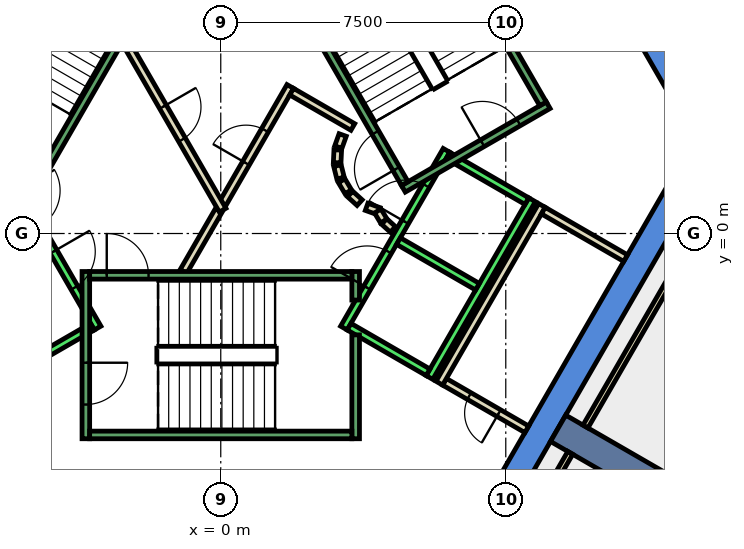
"""IFC4 building model, lengths in metres.
Left out: names, types, materials, properties, quantities, classifications, styles, units other than length and angle.
Written with IfcOpenShell. Run it as: python <this file> out.ifc"""

import sys

from ifc_helpers import new_model, si_unit, direction, frame, frame_2d, origin, place, context, subcontext, project, spatial, polyline, rectangle, outline, extrude, element, fill, save


model = new_model("IFC4")
c1 = context("Model", 3, precision=1e-05, world=origin(), true_north=direction((0.0, 1.0)))
c2 = subcontext(c1, "Body", "Model", "MODEL_VIEW")
j1 = project(units=[si_unit("LENGTHUNIT", "METRE"), si_unit("PLANEANGLEUNIT", "RADIAN")], contexts=[c1])
p1 = place(None, origin())
s1 = spatial("IfcSite", under=j1, at=p1, CompositionType="ELEMENT")
p2 = place(p1, origin())
s2 = spatial("IfcBuilding", under=s1, at=p2, CompositionType="ELEMENT")
p3 = place(p2, frame((0.0, 0.0, 202.4)))
s3 = spatial("IfcBuildingStorey", under=s2, at=p3, CompositionType="ELEMENT", Elevation=202.4)
p4 = place(p3, frame((0.0, 0.0, -0.4)))
e1 = element("IfcWall", 1, at=p4, inside=s3, PredefinedType="SHEAR", context=c2, shape_type="SweptSolid", body=[
    extrude(outline(polyline([(8.084, 11.498), (7.478, 11.148), (12.471, 2.5), (13.279, 2.5), (8.084, 11.498)])), origin(), (0.0, 0.0, 1.0), 4.2),
])
p5 = place(p3, frame((0.0, 0.0, -0.4)))
e2 = element("IfcWall", 2, at=p5, inside=s3, PredefinedType="SHEAR", context=c2, shape_type="SweptSolid", body=[
    extrude(outline(polyline([(6.64, -9.0), (13.279, 2.5), (12.471, 2.5), (6.235, -8.3), (6.64, -9.0)])), origin(), (0.0, 0.0, 1.0), 4.2),
])
p6 = place(p3, frame((8.877, -5.125, -0.4), z_axis=(0.0, 0.0, 1.0), x_axis=(0.866017533419, -0.500013631625, 0.0)))
e3 = element("IfcWall", 3, at=p6, inside=s3, PredefinedType="SHEAR", context=c2, shape_type="SweptSolid", body=[
    extrude(rectangle(XDim=9.0, YDim=0.8, at=frame_2d((4.5, 0.0))), origin(), (0.0, 0.0, 1.0), 4.2),
])
p7 = place(p3, frame((8.053, -5.152, 0.0), z_axis=(0.0, 0.0, 1.0), x_axis=(-0.866022959057, 0.500004234368, 0.0)))
e4 = element("IfcWall", 4, at=p7, inside=s3, PredefinedType="PARTITIONING", context=c2, shape_type="SweptSolid", body=[
    extrude(rectangle(XDim=2.5, YDim=0.2, at=frame_2d((1.25, 0.0))), origin(), (0.0, 0.0, 1.0), 3.8),
])
p8 = place(p7, frame((0.85, 0.0, 0.0)))
e5 = element("IfcOpeningElement", 5, at=p8, cuts=e4, PredefinedType="OPENING", context=c2, shape_type="SweptSolid", body=[
    extrude(rectangle(XDim=0.9, YDim=2.1, at=frame_2d((0.45, 1.05))), frame((0.0, 0.11, 0.0), z_axis=(0.0, -1.0, 0.0), x_axis=(1.0, 0.0, 0.0)), (0.0, 0.0, 1.0), 0.22),
])
p9 = place(p3, frame((5.751, -3.938, 0.0), z_axis=(0.0, 0.0, 1.0), x_axis=(0.500034260056, 0.866005622828, 0.0)))
e6 = element("IfcWall", 6, at=p9, inside=s3, PredefinedType="PARTITIONING", context=c2, shape_type="SweptSolid", body=[
    extrude(rectangle(XDim=5.399, YDim=0.2, at=frame_2d((2.7, 0.0))), origin(), (0.0, 0.0, 1.0), 3.8),
])
p10 = place(p3, frame((8.488, 0.602, 0.0), z_axis=(0.0, 0.0, 1.0), x_axis=(0.866022959057, -0.500004234368, 0.0)))
e7 = element("IfcWall", 7, at=p10, inside=s3, PredefinedType="PARTITIONING", context=c2, shape_type="SweptSolid", body=[
    extrude(rectangle(XDim=2.5, YDim=0.2, at=frame_2d((1.25, 0.0))), origin(), (0.0, 0.0, 1.0), 3.8),
])
p11 = place(p3, frame((7.283, -9.086, 0.0), z_axis=(0.0, 0.0, 1.0), x_axis=(0.500035303972, 0.866005020067, 0.0)))
e8 = element("IfcWall", 8, at=p11, inside=s3, PredefinedType="PARTITIONING", context=c2, shape_type="SweptSolid", body=[
    extrude(rectangle(XDim=3.828, YDim=0.15, at=frame_2d((1.914, 0.0))), origin(), (0.0, 0.0, 1.0), 3.8),
])
p12 = place(p3, frame((-0.982, -1.0, 0.0), z_axis=(0.0, 0.0, 1.0), x_axis=(0.50024047865, 0.865886518847, 0.0)))
e9 = element("IfcWall", 9, at=p12, inside=s3, PredefinedType="PARTITIONING", context=c2, shape_type="SweptSolid", body=[
    extrude(rectangle(XDim=1.863, YDim=0.2, at=frame_2d((0.931, 0.0))), origin(), (0.0, 0.0, 1.0), 3.8),
])
p13 = place(p3, frame((0.05, 0.787, 0.0), z_axis=(0.0, 0.0, 1.0), x_axis=(0.499954076797, 0.866051915934, 0.0)))
e10 = element("IfcWall", 10, at=p13, inside=s3, PredefinedType="PARTITIONING", context=c2, shape_type="SweptSolid", body=[
    extrude(rectangle(XDim=3.558, YDim=0.2, at=frame_2d((1.779, 0.0))), origin(), (0.0, 0.0, 1.0), 3.8),
])
p14 = place(p13, frame((1.229, 0.0, 0.0)))
e11 = element("IfcOpeningElement", 11, at=p14, cuts=e10, PredefinedType="OPENING", context=c2, shape_type="SweptSolid", body=[
    extrude(rectangle(XDim=1.0, YDim=2.1, at=frame_2d((0.5, 1.05))), frame((0.0, 0.11, 0.0), z_axis=(0.0, -1.0, 0.0), x_axis=(1.0, 0.0, 0.0)), (0.0, 0.0, 1.0), 0.22),
])
p15 = place(p3, frame((1.866, 3.732, 0.0), z_axis=(0.0, 0.0, 1.0), x_axis=(0.866043361281, -0.499968895414, 0.0)))
e12 = element("IfcWall", 12, at=p15, inside=s3, PredefinedType="PARTITIONING", context=c2, shape_type="SweptSolid", body=[
    extrude(rectangle(XDim=1.858, YDim=0.2, at=frame_2d((0.929, 0.0))), origin(), (0.0, 0.0, 1.0), 3.8),
])
p16 = place(p3, frame((3.208, 2.592, 0.0), z_axis=(0.0, 0.0, 1.0), x_axis=(-0.337388820924, -0.941365382578, 0.0)))
e13 = element("IfcWall", 13, at=p16, inside=s3, PredefinedType="PARTITIONING", context=c2, shape_type="SweptSolid", body=[
    extrude(rectangle(XDim=0.338, YDim=0.2, at=frame_2d((0.169, 0.0))), origin(), (0.0, 0.0, 1.0), 3.8),
])
p17 = place(p3, frame((3.079, 2.199, 0.0), z_axis=(0.0, 0.0, 1.0), x_axis=(-0.047771483479, -0.998858290933, 0.0)))
e14 = element("IfcWall", 14, at=p17, inside=s3, PredefinedType="PARTITIONING", context=c2, shape_type="SweptSolid", body=[
    extrude(rectangle(XDim=0.337, YDim=0.2, at=frame_2d((0.169, 0.0))), origin(), (0.0, 0.0, 1.0), 3.8),
])
p18 = place(p3, frame((3.07, 1.786, 0.0), z_axis=(0.0, 0.0, 1.0), x_axis=(0.242705583207, -0.970099994784, 0.0)))
e15 = element("IfcWall", 15, at=p18, inside=s3, PredefinedType="PARTITIONING", context=c2, shape_type="SweptSolid", body=[
    extrude(rectangle(XDim=0.338, YDim=0.2, at=frame_2d((0.169, 0.0))), origin(), (0.0, 0.0, 1.0), 3.8),
])
for number, where, z_axis, x_axis in (
    (16, (3.182, 1.388, 0.0), (0.0, 0.0, 1.0), (0.512, -0.859, 0.0)),
    (17, (3.404, 1.039, 0.0), (0.0, 0.0, 1.0), (0.74, -0.672, 0.0)),
):
    element("IfcWall", number, at=place(p3, frame(where, z_axis=z_axis, x_axis=x_axis)), inside=s3, PredefinedType="PARTITIONING", context=c2, shape_type="SweptSolid", body=[
        extrude(rectangle(XDim=0.338, YDim=0.2, at=frame_2d((0.169, 0.0))), origin(), (0.0, 0.0, 1.0), 3.8),
    ])
p19 = place(p3, frame((3.838, 0.702, 0.0), z_axis=(0.0, 0.0, 1.0), x_axis=(0.941035081519, -0.338308993895, 0.0)))
e18 = element("IfcWall", 18, at=p19, inside=s3, PredefinedType="PARTITIONING", context=c2, shape_type="SweptSolid", body=[
    extrude(rectangle(XDim=0.337, YDim=0.2, at=frame_2d((0.168, 0.0))), origin(), (0.0, 0.0, 1.0), 3.8),
])
p20 = place(p3, frame((4.132, 0.593, 0.0), z_axis=(0.0, 0.0, 1.0), x_axis=(0.513561617048, -0.858052717201, 0.0)))
e19 = element("IfcWall", 19, at=p20, inside=s3, PredefinedType="PARTITIONING", context=c2, shape_type="SweptSolid", body=[
    extrude(rectangle(XDim=0.308, YDim=0.2, at=frame_2d((0.154, 0.0))), origin(), (0.0, 0.0, 1.0), 3.8),
])
p21 = place(p3, frame((4.301, 0.315, 0.0), z_axis=(0.0, 0.0, 1.0), x_axis=(0.741798017506, -0.670623367639, 0.0)))
e20 = element("IfcWall", 20, at=p21, inside=s3, PredefinedType="PARTITIONING", context=c2, shape_type="SweptSolid", body=[
    extrude(rectangle(XDim=0.309, YDim=0.2, at=frame_2d((0.154, 0.0))), origin(), (0.0, 0.0, 1.0), 3.8),
])
p22 = place(p3, frame((-2.54, 5.1, 0.0), z_axis=(0.0, 0.0, 1.0), x_axis=(0.499925051871, -0.866068670783, 0.0)))
e21 = element("IfcWall", 21, at=p22, inside=s3, PredefinedType="PARTITIONING", context=c2, shape_type="SweptSolid", body=[
    extrude(rectangle(XDim=5.181, YDim=0.2, at=frame_2d((2.59, 0.0))), origin(), (0.0, 0.0, 1.0), 3.8),
])
p23 = place(p22, frame((2.04, 0.0, 0.0)))
e22 = element("IfcOpeningElement", 22, at=p23, cuts=e21, PredefinedType="OPENING", context=c2, shape_type="SweptSolid", body=[
    extrude(rectangle(XDim=1.0, YDim=2.1, at=frame_2d((0.5, 1.05))), frame((0.0, 0.11, 0.0), z_axis=(0.0, -1.0, 0.0), x_axis=(1.0, 0.0, 0.0)), (0.0, 0.0, 1.0), 0.22),
])
p24 = place(p3, frame((9.597, -5.079, 0.0), z_axis=(0.0, 0.0, 1.0), x_axis=(0.499962477963, 0.866047066059, 0.0)))
e23 = element("IfcWall", 23, at=p24, inside=s3, PredefinedType="PARTITIONING", context=c2, shape_type="SweptSolid", body=[
    extrude(rectangle(XDim=9.979, YDim=0.15, at=frame_2d((4.989, 0.0))), origin(), (0.0, 0.0, 1.0), 3.8),
])
p25 = place(p3, frame((-5.94, 2.188, 0.0), z_axis=(0.0, 0.0, 1.0), x_axis=(0.500034260056, -0.866005622828, 0.0)))
e24 = element("IfcWall", 24, at=p25, inside=s3, PredefinedType="STANDARD", context=c2, shape_type="SweptSolid", body=[
    extrude(rectangle(XDim=5.399, YDim=0.2, at=frame_2d((2.7, 0.0))), origin(), (0.0, 0.0, 1.0), 3.8),
])
p26 = place(p25, frame((3.075, 0.0, 0.0)))
e25 = element("IfcOpeningElement", 25, at=p26, cuts=e24, PredefinedType="OPENING", context=c2, shape_type="SweptSolid", body=[
    extrude(rectangle(XDim=1.1, YDim=2.1, at=frame_2d((0.55, 1.05))), frame((0.0, 0.11, 0.0), z_axis=(0.0, -1.0, 0.0), x_axis=(1.0, 0.0, 0.0)), (0.0, 0.0, 1.0), 0.22),
])
p27 = place(p25, frame((1.225, 0.0, 0.0)))
e26 = element("IfcOpeningElement", 26, at=p27, cuts=e24, PredefinedType="OPENING", context=c2, shape_type="SweptSolid", body=[
    extrude(rectangle(XDim=1.1, YDim=2.1, at=frame_2d((0.55, 1.05))), frame((0.0, 0.11, 0.0), z_axis=(0.0, -1.0, 0.0), x_axis=(1.0, 0.0, 0.0)), (0.0, 0.0, 1.0), 0.22),
])
p28 = place(p3, frame((-3.377, -2.452, 0.0), z_axis=(0.0, 0.0, 1.0), x_axis=(-0.865955154139, -0.50012165622, 0.0)))
e27 = element("IfcWall", 27, at=p28, inside=s3, PredefinedType="STANDARD", context=c2, shape_type="SweptSolid", body=[
    extrude(rectangle(XDim=2.4, YDim=0.2, at=frame_2d((1.2, 0.0))), origin(), (0.0, 0.0, 1.0), 3.8),
])
p29 = place(p3, frame((3.24, -2.488, 0.0), z_axis=(0.0, 0.0, 1.0), x_axis=(0.500034260056, 0.866005622828, 0.0)))
e28 = element("IfcWall", 28, at=p29, inside=s3, PredefinedType="STANDARD", context=c2, shape_type="SweptSolid", body=[
    extrude(rectangle(XDim=5.399, YDim=0.2, at=frame_2d((2.7, 0.0))), origin(), (0.0, 0.0, 1.0), 3.8),
])
p30 = place(p29, frame((3.225, 0.0, 0.0)))
e29 = element("IfcOpeningElement", 29, at=p30, cuts=e28, PredefinedType="OPENING", context=c2, shape_type="SweptSolid", body=[
    extrude(rectangle(XDim=1.1, YDim=2.1, at=frame_2d((0.55, 1.05))), frame((0.0, 0.11, 0.0), z_axis=(0.0, -1.0, 0.0), x_axis=(1.0, 0.0, 0.0)), (0.0, 0.0, 1.0), 0.22),
])
p31 = place(p29, frame((1.225, 0.0, 0.0)))
e30 = element("IfcOpeningElement", 30, at=p31, cuts=e28, PredefinedType="OPENING", context=c2, shape_type="SweptSolid", body=[
    extrude(rectangle(XDim=1.1, YDim=2.1, at=frame_2d((0.55, 1.05))), frame((0.0, 0.11, 0.0), z_axis=(0.0, -1.0, 0.0), x_axis=(1.0, 0.0, 0.0)), (0.0, 0.0, 1.0), 0.22),
])
p32 = place(p3, frame((5.492, -3.788, 0.0), z_axis=(0.0, 0.0, 1.0), x_axis=(0.500034260056, 0.866005622828, 0.0)))
e31 = element("IfcWall", 31, at=p32, inside=s3, PredefinedType="STANDARD", context=c2, shape_type="SweptSolid", body=[
    extrude(rectangle(XDim=5.399, YDim=0.2, at=frame_2d((2.7, 0.0))), origin(), (0.0, 0.0, 1.0), 3.8),
])
p33 = place(p3, frame((3.377, -2.452, 0.0), z_axis=(0.0, 0.0, 1.0), x_axis=(0.865955154139, -0.50012165622, 0.0)))
e32 = element("IfcWall", 32, at=p33, inside=s3, PredefinedType="STANDARD", context=c2, shape_type="SweptSolid", body=[
    extrude(rectangle(XDim=2.4, YDim=0.2, at=frame_2d((1.2, 0.0))), origin(), (0.0, 0.0, 1.0), 3.8),
])
for number, where, z_axis, x_axis in (
    (33, (4.677, -0.2, 0.0), (0.0, 0.0, 1.0), (0.866, -0.5, 0.0)),
    (34, (5.977, 2.052, 0.0), (0.0, 0.0, 1.0), (0.866, -0.5, 0.0)),
):
    element("IfcWall", number, at=place(p3, frame(where, z_axis=z_axis, x_axis=x_axis)), inside=s3, PredefinedType="STANDARD", context=c2, shape_type="SweptSolid", body=[
        extrude(rectangle(XDim=2.399, YDim=0.2, at=frame_2d((1.2, 0.0))), origin(), (0.0, 0.0, 1.0), 3.8),
    ])
p34 = place(p3, frame((-3.55, -1.0, 0.0), z_axis=(0.0, 0.0, 1.0), x_axis=(0.0, -1.0, 0.0)))
e35 = element("IfcWall", 35, at=p34, inside=s3, PredefinedType="STANDARD", context=c2, shape_type="SweptSolid", body=[
    extrude(rectangle(XDim=4.4, YDim=0.2, at=frame_2d((2.2, 0.0))), origin(), (0.0, 0.0, 1.0), 3.8),
])
p35 = place(p34, frame((2.4, 0.0, 0.0)))
e36 = element("IfcOpeningElement", 36, at=p35, cuts=e35, PredefinedType="OPENING", context=c2, shape_type="SweptSolid", body=[
    extrude(rectangle(XDim=1.1, YDim=2.2, at=frame_2d((0.55, 1.1))), frame((0.0, 0.11, 0.0), z_axis=(0.0, -1.0, 0.0), x_axis=(1.0, 0.0, 0.0)), (0.0, 0.0, 1.0), 0.22),
])
p36 = place(p3, frame((3.55, -2.667, 0.0), z_axis=(0.0, 0.0, 1.0), x_axis=(0.0, -1.0, 0.0)))
e37 = element("IfcWall", 37, at=p36, inside=s3, PredefinedType="STANDARD", context=c2, shape_type="SweptSolid", body=[
    extrude(rectangle(XDim=2.733, YDim=0.2, at=frame_2d((1.366, 0.0))), origin(), (0.0, 0.0, 1.0), 3.8),
])
p37 = place(p3, frame((3.55, -1.0, 0.0), z_axis=(0.0, 0.0, 1.0), x_axis=(0.0, -1.0, 0.0)))
e38 = element("IfcWall", 38, at=p37, inside=s3, PredefinedType="STANDARD", context=c2, shape_type="SweptSolid", body=[
    extrude(rectangle(XDim=0.751, YDim=0.2, at=frame_2d((0.375, 0.0))), origin(), (0.0, 0.0, 1.0), 3.8),
])
p38 = place(p3, frame((-3.45, -1.1, 0.0), z_axis=(0.0, 0.0, 1.0), x_axis=(1.0, 0.0, 0.0)))
e39 = element("IfcWall", 39, at=p38, inside=s3, PredefinedType="STANDARD", context=c2, shape_type="SweptSolid", body=[
    extrude(rectangle(XDim=6.9, YDim=0.2, at=frame_2d((3.45, 0.0))), origin(), (0.0, 0.0, 1.0), 3.8),
])
p39 = place(p38, frame((0.45, 0.0, 0.0)))
e40 = element("IfcOpeningElement", 40, at=p39, cuts=e39, PredefinedType="OPENING", context=c2, shape_type="SweptSolid", body=[
    extrude(rectangle(XDim=1.1, YDim=2.2, at=frame_2d((0.55, 1.1))), frame((0.0, 0.11, 0.0), z_axis=(0.0, -1.0, 0.0), x_axis=(1.0, 0.0, 0.0)), (0.0, 0.0, 1.0), 0.22),
])
p40 = place(p3, frame((-3.45, -5.3, 0.0), z_axis=(0.0, 0.0, 1.0), x_axis=(1.0, 0.0, 0.0)))
e41 = element("IfcWall", 41, at=p40, inside=s3, PredefinedType="STANDARD", context=c2, shape_type="SweptSolid", body=[
    extrude(rectangle(XDim=6.9, YDim=0.2, at=frame_2d((3.45, 0.0))), origin(), (0.0, 0.0, 1.0), 3.8),
])
p41 = place(p3, frame((4.806, 1.176, 0.0), z_axis=(0.0, 0.0, 1.0), x_axis=(0.866059941101, 0.499940174841, 0.0)))
e42 = element("IfcWall", 42, at=p41, inside=s3, PredefinedType="STANDARD", context=c2, shape_type="SweptSolid", body=[
    extrude(rectangle(XDim=4.4, YDim=0.2, at=frame_2d((2.2, 0.0))), origin(), (0.0, 0.0, 1.0), 3.8),
])
p42 = place(p41, frame((2.4, 0.0, 0.0)))
e43 = element("IfcOpeningElement", 43, at=p42, cuts=e42, PredefinedType="OPENING", context=c2, shape_type="SweptSolid", body=[
    extrude(rectangle(XDim=1.1, YDim=2.2, at=frame_2d((0.55, 1.1))), frame((0.0, 0.11, 0.0), z_axis=(0.0, -1.0, 0.0), x_axis=(1.0, 0.0, 0.0)), (0.0, 0.0, 1.0), 0.22),
])
p43 = place(p3, frame((4.843, 1.312, 0.0), z_axis=(0.0, 0.0, 1.0), x_axis=(-0.499963383562, 0.866046543262, 0.0)))
e44 = element("IfcWall", 44, at=p43, inside=s3, PredefinedType="STANDARD", context=c2, shape_type="SweptSolid", body=[
    extrude(rectangle(XDim=6.9, YDim=0.2, at=frame_2d((3.45, 0.0))), origin(), (0.0, 0.0, 1.0), 3.8),
])
p44 = place(p43, frame((0.45, 0.0, 0.0)))
e45 = element("IfcOpeningElement", 45, at=p44, cuts=e44, PredefinedType="OPENING", context=c2, shape_type="SweptSolid", body=[
    extrude(rectangle(XDim=1.1, YDim=2.2, at=frame_2d((0.55, 1.1))), frame((0.0, 0.11, 0.0), z_axis=(0.0, -1.0, 0.0), x_axis=(1.0, 0.0, 0.0)), (0.0, 0.0, 1.0), 0.22),
])
p45 = place(p3, frame((8.48, 3.412, 0.0), z_axis=(0.0, 0.0, 1.0), x_axis=(-0.499978703459, 0.866037698999, 0.0)))
e46 = element("IfcWall", 46, at=p45, inside=s3, PredefinedType="STANDARD", context=c2, shape_type="SweptSolid", body=[
    extrude(rectangle(XDim=6.9, YDim=0.2, at=frame_2d((3.45, 0.0))), origin(), (0.0, 0.0, 1.0), 3.8),
])
p46 = place(p3, frame((-1.393, 7.288, 0.0), z_axis=(0.0, 0.0, 1.0), x_axis=(-0.499963383562, -0.866046543262, 0.0)))
e47 = element("IfcWall", 47, at=p46, inside=s3, PredefinedType="STANDARD", context=c2, shape_type="SweptSolid", body=[
    extrude(rectangle(XDim=6.9, YDim=0.2, at=frame_2d((3.45, 0.0))), origin(), (0.0, 0.0, 1.0), 3.8),
])
p47 = place(p46, frame((0.45, 0.0, 0.0)))
e48 = element("IfcOpeningElement", 48, at=p47, cuts=e47, PredefinedType="OPENING", context=c2, shape_type="SweptSolid", body=[
    extrude(rectangle(XDim=1.1, YDim=2.2, at=frame_2d((0.55, 1.1))), frame((0.0, 0.11, 0.0), z_axis=(0.0, -1.0, 0.0), x_axis=(1.0, 0.0, 0.0)), (0.0, 0.0, 1.0), 0.22),
])
p48 = place(p14, origin())
e49 = element("IfcDoor", 49, at=p48, inside=s3, OperationType="SINGLE_SWING_RIGHT", PredefinedType="DOOR", context=c2, shape_type="SweptSolid", body=[
    extrude(rectangle(XDim=1.0, YDim=2.1, at=frame_2d((0.5, 1.05))), frame((0.0, 0.025, 0.0), z_axis=(0.0, -1.0, 0.0), x_axis=(1.0, 0.0, 0.0)), (0.0, 0.0, 1.0), 0.05),
])
fill(e11, e49)
p49 = place(p23, origin())
e50 = element("IfcDoor", 50, at=p49, inside=s3, OperationType="SINGLE_SWING_RIGHT", PredefinedType="DOOR", context=c2, shape_type="SweptSolid", body=[
    extrude(rectangle(XDim=1.0, YDim=2.1, at=frame_2d((0.5, 1.05))), frame((0.0, 0.025, 0.0), z_axis=(0.0, -1.0, 0.0), x_axis=(1.0, 0.0, 0.0)), (0.0, 0.0, 1.0), 0.05),
])
fill(e22, e50)
p50 = place(p8, origin())
e51 = element("IfcDoor", 51, at=p50, inside=s3, OperationType="SINGLE_SWING_LEFT", PredefinedType="DOOR", context=c2, shape_type="SweptSolid", body=[
    extrude(rectangle(XDim=0.9, YDim=2.1, at=frame_2d((0.45, 1.05))), frame((0.0, 0.025, 0.0), z_axis=(0.0, -1.0, 0.0), x_axis=(1.0, 0.0, 0.0)), (0.0, 0.0, 1.0), 0.05),
])
fill(e5, e51)
p51 = place(p30, origin())
e52 = element("IfcDoor", 52, at=p51, inside=s3, OperationType="SLIDING_TO_LEFT", PredefinedType="DOOR", context=c2, shape_type="SweptSolid", body=[
    extrude(rectangle(XDim=1.1, YDim=2.1, at=frame_2d((0.55, 1.05))), frame((0.0, 0.025, 0.0), z_axis=(0.0, -1.0, 0.0), x_axis=(1.0, 0.0, 0.0)), (0.0, 0.0, 1.0), 0.05),
])
fill(e29, e52)
p52 = place(p26, origin())
e53 = element("IfcDoor", 53, at=p52, inside=s3, OperationType="SLIDING_TO_LEFT", PredefinedType="DOOR", context=c2, shape_type="SweptSolid", body=[
    extrude(rectangle(XDim=1.1, YDim=2.1, at=frame_2d((0.55, 1.05))), frame((0.0, 0.025, 0.0), z_axis=(0.0, -1.0, 0.0), x_axis=(1.0, 0.0, 0.0)), (0.0, 0.0, 1.0), 0.05),
])
fill(e25, e53)
p53 = place(p31, origin())
e54 = element("IfcDoor", 54, at=p53, inside=s3, OperationType="SLIDING_TO_LEFT", PredefinedType="DOOR", context=c2, shape_type="SweptSolid", body=[
    extrude(rectangle(XDim=1.1, YDim=2.1, at=frame_2d((0.55, 1.05))), frame((0.0, 0.025, 0.0), z_axis=(0.0, -1.0, 0.0), x_axis=(1.0, 0.0, 0.0)), (0.0, 0.0, 1.0), 0.05),
])
fill(e30, e54)
p54 = place(p39, origin())
e55 = element("IfcDoor", 55, at=p54, inside=s3, OperationType="SINGLE_SWING_LEFT", PredefinedType="DOOR", context=c2, shape_type="SweptSolid", body=[
    extrude(rectangle(XDim=1.1, YDim=2.2, at=frame_2d((0.55, 1.1))), frame((0.0, 0.025, 0.0), z_axis=(0.0, -1.0, 0.0), x_axis=(1.0, 0.0, 0.0)), (0.0, 0.0, 1.0), 0.05),
])
fill(e40, e55)
p55 = place(p35, origin())
e56 = element("IfcDoor", 56, at=p55, inside=s3, OperationType="SINGLE_SWING_LEFT", PredefinedType="DOOR", context=c2, shape_type="SweptSolid", body=[
    extrude(rectangle(XDim=1.1, YDim=2.2, at=frame_2d((0.55, 1.1))), frame((0.0, 0.025, 0.0), z_axis=(0.0, -1.0, 0.0), x_axis=(1.0, 0.0, 0.0)), (0.0, 0.0, 1.0), 0.05),
])
fill(e36, e56)
p56 = place(p44, origin())
e57 = element("IfcDoor", 57, at=p56, inside=s3, OperationType="SINGLE_SWING_LEFT", PredefinedType="DOOR", context=c2, shape_type="SweptSolid", body=[
    extrude(rectangle(XDim=1.1, YDim=2.2, at=frame_2d((0.55, 1.1))), frame((0.0, 0.025, 0.0), z_axis=(0.0, -1.0, 0.0), x_axis=(1.0, 0.0, 0.0)), (0.0, 0.0, 1.0), 0.05),
])
fill(e45, e57)
p57 = place(p42, origin())
e58 = element("IfcDoor", 58, at=p57, inside=s3, OperationType="SINGLE_SWING_LEFT", PredefinedType="DOOR", context=c2, shape_type="SweptSolid", body=[
    extrude(rectangle(XDim=1.1, YDim=2.2, at=frame_2d((0.55, 1.1))), frame((0.0, 0.025, 0.0), z_axis=(0.0, -1.0, 0.0), x_axis=(1.0, 0.0, 0.0)), (0.0, 0.0, 1.0), 0.05),
])
fill(e43, e58)
save(model, sys.argv[1])
